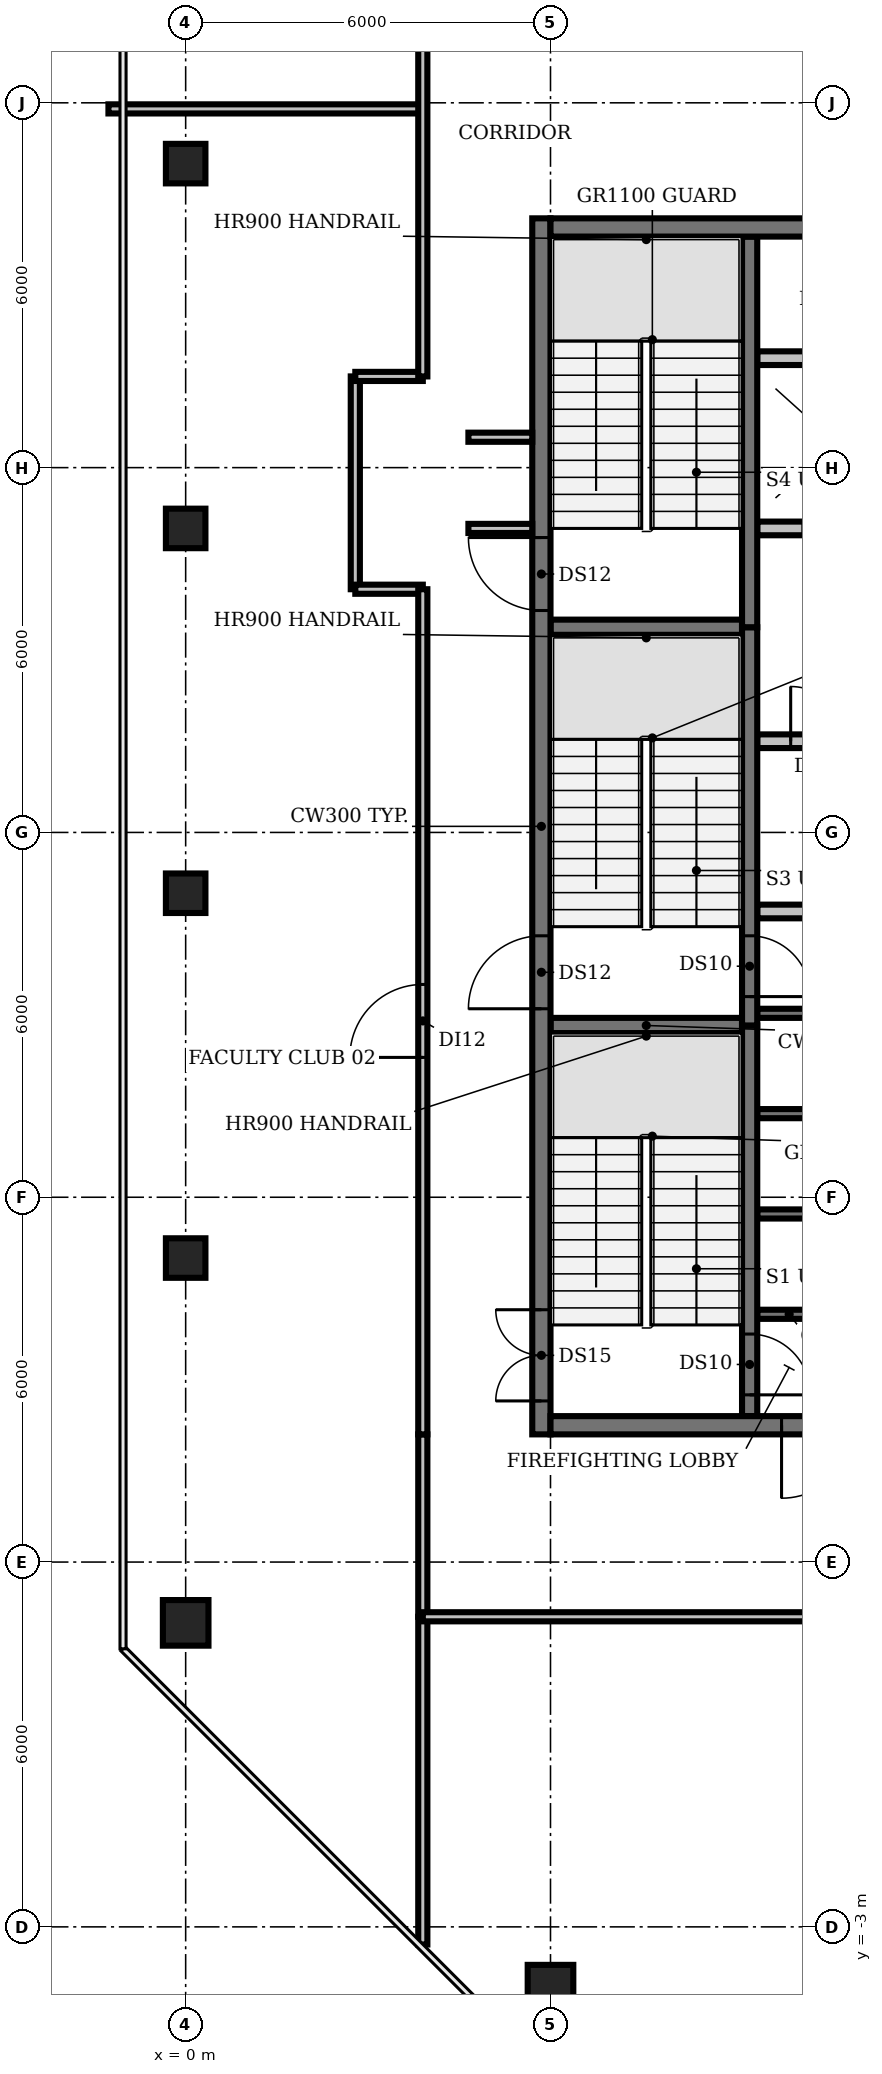
"""IFC4 building model, lengths in metres.
Left out: names, types, materials, properties, quantities, classifications, styles, units other than length and angle.
Written with IfcOpenShell. Run it as: python <this file> out.ifc"""

import sys

from ifc_helpers import new_model, si_unit, direction, frame, frame_2d, origin, origin_2d, place, context, subcontext, project, spatial, rectangle, circle, extrude, element, fill, save


model = new_model("IFC4")
c1 = context("Model", 3, precision=1e-05, world=origin(), true_north=direction((0.0, 1.0)))
c2 = subcontext(c1, "Body", "Model", "MODEL_VIEW")
j1 = project(units=[si_unit("LENGTHUNIT", "METRE"), si_unit("PLANEANGLEUNIT", "RADIAN")], contexts=[c1])
p1 = place(None, origin())
s1 = spatial("IfcSite", under=j1, at=p1, CompositionType="ELEMENT")
p2 = place(p1, origin())
s2 = spatial("IfcBuilding", under=s1, at=p2, CompositionType="ELEMENT")
p3 = place(p2, frame((0.0, 0.0, 318.8)))
s3 = spatial("IfcBuildingStorey", under=s2, at=p3, CompositionType="ELEMENT", Elevation=318.8)
p4 = place(p3, frame((0.0, 2.0, 0.0), z_axis=(0.0, 0.0, 1.0), x_axis=(1.0, 0.0, 0.0)))
e1 = element("IfcColumn", 1, at=p4, inside=s3, PredefinedType="COLUMN", context=c2, shape_type="SweptSolid", body=[
    extrude(circle(Radius=0.375, at=origin_2d()), origin(), (0.0, 0.0, 1.0), 3.9),
])
for number, where, z_axis, x_axis in (
    (2, (0.0, 8.0, 0.0), (0.0, 0.0, 1.0), (1.0, 0.0, 0.0)),
    (3, (0.0, 14.0, 0.0), (0.0, 0.0, 1.0), (1.0, 0.0, 0.0)),
    (4, (0.0, 20.0, 0.0), (0.0, 0.0, 1.0), (1.0, 0.0, 0.0)),
    (5, (0.0, 26.0, 0.0), (0.0, 0.0, 1.0), (1.0, 0.0, 0.0)),
):
    element("IfcColumn", number, at=place(p3, frame(where, z_axis=z_axis, x_axis=x_axis)), inside=s3, PredefinedType="COLUMN", context=c2, shape_type="SweptSolid", body=[
        extrude(rectangle(XDim=0.65, YDim=0.65, at=origin_2d()), origin(), (0.0, 0.0, 1.0), 3.9),
    ])
p5 = place(p3, frame((6.0, -4.0, 0.0), z_axis=(0.0, 0.0, 1.0), x_axis=(1.0, 0.0, 0.0)))
e6 = element("IfcColumn", 6, at=p5, inside=s3, PredefinedType="COLUMN", context=c2, shape_type="SweptSolid", body=[
    extrude(circle(Radius=0.375, at=origin_2d()), origin(), (0.0, 0.0, 1.0), 3.9),
])
for number, where, z_axis, x_axis in (
    (7, (9.4, 7.075, 0.0), (0.0, 0.0, 1.0), (1.0, 0.0, 0.0)),
    (8, (9.4, 8.725, 0.0), (0.0, 0.0, 1.0), (1.0, 0.0, 0.0)),
    (9, (9.4, 10.375, 0.0), (0.0, 0.0, 1.0), (1.0, 0.0, 0.0)),
):
    element("IfcWall", number, at=place(p3, frame(where, z_axis=z_axis, x_axis=x_axis)), inside=s3, PredefinedType="SHEAR", context=c2, shape_type="SweptSolid", body=[
        extrude(rectangle(XDim=1.05, YDim=0.15, at=frame_2d((0.525, 0.0))), origin(), (0.0, 0.0, 1.0), 3.9),
    ])
p6 = place(p3, frame((6.0, 11.825, 0.0), z_axis=(0.0, 0.0, 1.0), x_axis=(1.0, 0.0, 0.0)))
e10 = element("IfcWall", 10, at=p6, inside=s3, PredefinedType="SHEAR", context=c2, shape_type="SweptSolid", body=[
    extrude(rectangle(XDim=3.15, YDim=0.25, at=frame_2d((1.575, 0.0))), origin(), (0.0, 0.0, 1.0), 3.9),
])
p7 = place(p3, frame((9.4, 12.025, 0.0), z_axis=(0.0, 0.0, 1.0), x_axis=(1.0, 0.0, 0.0)))
e11 = element("IfcWall", 11, at=p7, inside=s3, PredefinedType="SHEAR", context=c2, shape_type="SweptSolid", body=[
    extrude(rectangle(XDim=1.05, YDim=0.15, at=frame_2d((0.525, 0.0))), origin(), (0.0, 0.0, 1.0), 3.9),
])
p8 = place(p3, frame((9.4, 13.7, 0.0), z_axis=(0.0, 0.0, 1.0), x_axis=(1.0, 0.0, 0.0)))
e12 = element("IfcWall", 12, at=p8, inside=s3, PredefinedType="PARTITIONING", context=c2, shape_type="SweptSolid", body=[
    extrude(rectangle(XDim=4.0, YDim=0.225, at=frame_2d((2.0, 0.0))), origin(), (0.0, 0.0, 1.0), 3.9),
])
p9 = place(p3, frame((9.4, 16.5, 0.0), z_axis=(0.0, 0.0, 1.0), x_axis=(1.0, 0.0, 0.0)))
e13 = element("IfcWall", 13, at=p9, inside=s3, PredefinedType="PARTITIONING", context=c2, shape_type="SweptSolid", body=[
    extrude(rectangle(XDim=14.6, YDim=0.225, at=frame_2d((7.3, 0.0))), origin(), (0.0, 0.0, 1.0), 3.9),
])
p10 = place(p9, frame((0.55, 0.0, 0.0)))
e14 = element("IfcOpeningElement", 14, at=p10, cuts=e13, PredefinedType="OPENING", context=c2, shape_type="SweptSolid", body=[
    extrude(rectangle(XDim=0.9, YDim=2.1, at=frame_2d((0.45, 1.05))), frame((0.0, 0.123, 0.0), z_axis=(0.0, -1.0, 0.0), x_axis=(1.0, 0.0, 0.0)), (0.0, 0.0, 1.0), 0.245),
])
p11 = place(p9, frame((6.075, 0.0, 0.0)))
e15 = element("IfcOpeningElement", 15, at=p11, cuts=e13, PredefinedType="OPENING", context=c2, shape_type="SweptSolid", body=[
    extrude(rectangle(XDim=1.0, YDim=2.1, at=frame_2d((0.5, 1.05))), frame((0.0, 0.123, 0.0), z_axis=(0.0, -1.0, 0.0), x_axis=(1.0, 0.0, 0.0)), (0.0, 0.0, 1.0), 0.245),
])
p12 = place(p9, frame((12.4, 0.0, 0.0)))
e16 = element("IfcOpeningElement", 16, at=p12, cuts=e13, PredefinedType="OPENING", context=c2, shape_type="SweptSolid", body=[
    extrude(rectangle(XDim=1.0, YDim=2.1, at=frame_2d((0.5, 1.05))), frame((0.0, 0.123, 0.0), z_axis=(0.0, -1.0, 0.0), x_axis=(1.0, 0.0, 0.0)), (0.0, 0.0, 1.0), 0.245),
])
p13 = place(p3, frame((6.0, 18.375, 0.0), z_axis=(0.0, 0.0, 1.0), x_axis=(1.0, 0.0, 0.0)))
e17 = element("IfcWall", 17, at=p13, inside=s3, PredefinedType="SHEAR", context=c2, shape_type="SweptSolid", body=[
    extrude(rectangle(XDim=3.15, YDim=0.25, at=frame_2d((1.575, 0.0))), origin(), (0.0, 0.0, 1.0), 3.9),
])
p14 = place(p3, frame((24.0, 20.0, 0.0), z_axis=(0.0, 0.0, 1.0), x_axis=(-1.0, 0.0, 0.0)))
e18 = element("IfcWall", 18, at=p14, inside=s3, PredefinedType="PARTITIONING", context=c2, shape_type="SweptSolid", body=[
    extrude(rectangle(XDim=14.6, YDim=0.225, at=frame_2d((7.3, 0.0))), origin(), (0.0, 0.0, 1.0), 3.9),
])
p15 = place(p14, frame((12.75, 0.0, 0.0)))
e19 = element("IfcOpeningElement", 19, at=p15, cuts=e18, PredefinedType="OPENING", context=c2, shape_type="SweptSolid", body=[
    extrude(rectangle(XDim=1.1, YDim=2.1, at=frame_2d((0.55, 1.05))), frame((0.0, 0.123, 0.0), z_axis=(0.0, -1.0, 0.0), x_axis=(1.0, 0.0, 0.0)), (0.0, 0.0, 1.0), 0.245),
])
p16 = place(p14, frame((9.95, 0.0, 0.0)))
e20 = element("IfcOpeningElement", 20, at=p16, cuts=e18, PredefinedType="OPENING", context=c2, shape_type="SweptSolid", body=[
    extrude(rectangle(XDim=1.1, YDim=2.1, at=frame_2d((0.55, 1.05))), frame((0.0, 0.123, 0.0), z_axis=(0.0, -1.0, 0.0), x_axis=(1.0, 0.0, 0.0)), (0.0, 0.0, 1.0), 0.245),
])
p17 = place(p14, frame((7.15, 0.0, 0.0)))
e21 = element("IfcOpeningElement", 21, at=p17, cuts=e18, PredefinedType="OPENING", context=c2, shape_type="SweptSolid", body=[
    extrude(rectangle(XDim=1.1, YDim=2.1, at=frame_2d((0.55, 1.05))), frame((0.0, 0.123, 0.0), z_axis=(0.0, -1.0, 0.0), x_axis=(1.0, 0.0, 0.0)), (0.0, 0.0, 1.0), 0.245),
])
p18 = place(p14, frame((4.35, 0.0, 0.0)))
e22 = element("IfcOpeningElement", 22, at=p18, cuts=e18, PredefinedType="OPENING", context=c2, shape_type="SweptSolid", body=[
    extrude(rectangle(XDim=1.1, YDim=2.1, at=frame_2d((0.55, 1.05))), frame((0.0, 0.123, 0.0), z_axis=(0.0, -1.0, 0.0), x_axis=(1.0, 0.0, 0.0)), (0.0, 0.0, 1.0), 0.245),
])
p19 = place(p14, frame((1.2, 0.0, 0.0)))
e23 = element("IfcOpeningElement", 23, at=p19, cuts=e18, PredefinedType="OPENING", context=c2, shape_type="SweptSolid", body=[
    extrude(rectangle(XDim=1.0, YDim=2.1, at=frame_2d((0.5, 1.05))), frame((0.0, 0.123, 0.0), z_axis=(0.0, -1.0, 0.0), x_axis=(1.0, 0.0, 0.0)), (0.0, 0.0, 1.0), 0.245),
])
p20 = place(p3, frame((9.4, 22.8, 0.0), z_axis=(0.0, 0.0, 1.0), x_axis=(1.0, 0.0, 0.0)))
e24 = element("IfcWall", 24, at=p20, inside=s3, PredefinedType="PARTITIONING", context=c2, shape_type="SweptSolid", body=[
    extrude(rectangle(XDim=14.6, YDim=0.225, at=frame_2d((7.3, 0.0))), origin(), (0.0, 0.0, 1.0), 3.9),
])
p21 = place(p3, frame((9.275, 11.825, 0.0), z_axis=(0.0, 0.0, 1.0), x_axis=(0.0, -1.0, 0.0)))
e25 = element("IfcWall", 25, at=p21, inside=s3, PredefinedType="SHEAR", context=c2, shape_type="SweptSolid", body=[
    extrude(rectangle(XDim=6.425, YDim=0.25, at=frame_2d((3.212, 0.0))), origin(), (0.0, 0.0, 1.0), 3.9),
])
p22 = place(p21, frame((5.075, 0.0, 0.0)))
e26 = element("IfcOpeningElement", 26, at=p22, cuts=e25, PredefinedType="OPENING", context=c2, shape_type="SweptSolid", body=[
    extrude(rectangle(XDim=1.0, YDim=2.1, at=frame_2d((0.5, 1.05))), frame((0.0, 0.135, 0.0), z_axis=(0.0, -1.0, 0.0), x_axis=(1.0, 0.0, 0.0)), (0.0, 0.0, 1.0), 0.27),
])
p23 = place(p3, frame((9.275, 18.375, 0.0), z_axis=(0.0, 0.0, 1.0), x_axis=(0.0, -1.0, 0.0)))
e27 = element("IfcWall", 27, at=p23, inside=s3, PredefinedType="SHEAR", context=c2, shape_type="SweptSolid", body=[
    extrude(rectangle(XDim=6.55, YDim=0.25, at=frame_2d((3.275, 0.0))), origin(), (0.0, 0.0, 1.0), 3.9),
])
p24 = place(p23, frame((5.075, 0.0, 0.0)))
e28 = element("IfcOpeningElement", 28, at=p24, cuts=e27, PredefinedType="OPENING", context=c2, shape_type="SweptSolid", body=[
    extrude(rectangle(XDim=1.0, YDim=2.1, at=frame_2d((0.5, 1.05))), frame((0.0, 0.135, 0.0), z_axis=(0.0, -1.0, 0.0), x_axis=(1.0, 0.0, 0.0)), (0.0, 0.0, 1.0), 0.27),
])
p25 = place(p3, frame((9.275, 18.375, 0.0), z_axis=(0.0, 0.0, 1.0), x_axis=(0.0, 1.0, 0.0)))
e29 = element("IfcWall", 29, at=p25, inside=s3, PredefinedType="SHEAR", context=c2, shape_type="SweptSolid", body=[
    extrude(rectangle(XDim=6.425, YDim=0.25, at=frame_2d((3.212, 0.0))), origin(), (0.0, 0.0, 1.0), 3.9),
])
p26 = place(p3, frame((5.85, 5.1, 0.0), z_axis=(0.0, 0.0, 1.0), x_axis=(0.0, 1.0, 0.0)))
e30 = element("IfcWall", 30, at=p26, inside=s3, PredefinedType="SHEAR", context=c2, shape_type="SweptSolid", body=[
    extrude(rectangle(XDim=20.0, YDim=0.3, at=frame_2d((10.0, 0.0))), origin(), (0.0, 0.0, 1.0), 3.9),
])
p27 = place(p26, frame((0.55, 0.0, 0.0)))
e31 = element("IfcOpeningElement", 31, at=p27, cuts=e30, PredefinedType="OPENING", context=c2, shape_type="SweptSolid", body=[
    extrude(rectangle(XDim=1.5, YDim=2.1, at=frame_2d((0.75, 1.05))), frame((0.0, 0.16, 0.0), z_axis=(0.0, -1.0, 0.0), x_axis=(1.0, 0.0, 0.0)), (0.0, 0.0, 1.0), 0.32),
])
p28 = place(p26, frame((7.0, 0.0, 0.0)))
e32 = element("IfcOpeningElement", 32, at=p28, cuts=e30, PredefinedType="OPENING", context=c2, shape_type="SweptSolid", body=[
    extrude(rectangle(XDim=1.2, YDim=2.1, at=frame_2d((0.6, 1.05))), frame((0.0, 0.16, 0.0), z_axis=(0.0, -1.0, 0.0), x_axis=(1.0, 0.0, 0.0)), (0.0, 0.0, 1.0), 0.32),
])
p29 = place(p26, frame((13.55, 0.0, 0.0)))
e33 = element("IfcOpeningElement", 33, at=p29, cuts=e30, PredefinedType="OPENING", context=c2, shape_type="SweptSolid", body=[
    extrude(rectangle(XDim=1.2, YDim=2.1, at=frame_2d((0.6, 1.05))), frame((0.0, 0.16, 0.0), z_axis=(0.0, -1.0, 0.0), x_axis=(1.0, 0.0, 0.0)), (0.0, 0.0, 1.0), 0.32),
])
p30 = place(p3, frame((24.0, 5.25, 0.0), z_axis=(0.0, 0.0, 1.0), x_axis=(-1.0, 0.0, 0.0)))
e34 = element("IfcWall", 34, at=p30, inside=s3, PredefinedType="SHEAR", context=c2, shape_type="SweptSolid", body=[
    extrude(rectangle(XDim=18.0, YDim=0.3, at=frame_2d((9.0, 0.0))), origin(), (0.0, 0.0, 1.0), 3.9),
])
p31 = place(p30, frame((13.0, 0.0, 0.0)))
e35 = element("IfcOpeningElement", 35, at=p31, cuts=e34, PredefinedType="OPENING", context=c2, shape_type="SweptSolid", body=[
    extrude(rectangle(XDim=1.2, YDim=2.1, at=frame_2d((0.6, 1.05))), frame((0.0, 0.16, 0.0), z_axis=(0.0, -1.0, 0.0), x_axis=(1.0, 0.0, 0.0)), (0.0, 0.0, 1.0), 0.32),
])
p32 = place(p30, frame((4.9, 0.0, 0.0)))
e36 = element("IfcOpeningElement", 36, at=p32, cuts=e34, PredefinedType="OPENING", context=c2, shape_type="SweptSolid", body=[
    extrude(rectangle(XDim=1.0, YDim=2.1, at=frame_2d((0.5, 1.05))), frame((0.0, 0.16, 0.0), z_axis=(0.0, -1.0, 0.0), x_axis=(1.0, 0.0, 0.0)), (0.0, 0.0, 1.0), 0.32),
])
p33 = place(p3, frame((6.0, 24.95, 0.0), z_axis=(0.0, 0.0, 1.0), x_axis=(1.0, 0.0, 0.0)))
e37 = element("IfcWall", 37, at=p33, inside=s3, PredefinedType="SHEAR", context=c2, shape_type="SweptSolid", body=[
    extrude(rectangle(XDim=18.0, YDim=0.3, at=frame_2d((9.0, 0.0))), origin(), (0.0, 0.0, 1.0), 3.9),
])
p34 = place(p3, frame((-1.27, 26.9, 0.0), z_axis=(0.0, 0.0, 1.0), x_axis=(1.0, 0.0, 0.0)))
e38 = element("IfcWall", 38, at=p34, inside=s3, PredefinedType="PARTITIONING", context=c2, shape_type="SweptSolid", body=[
    extrude(rectangle(XDim=5.17, YDim=0.15, at=frame_2d((2.585, 0.0))), origin(), (0.0, 0.0, 1.0), 2.95),
])
p35 = place(p3, frame((2.79, 19.0, 0.0), z_axis=(0.0, 0.0, 1.0), x_axis=(0.0, 1.0, 0.0)))
e39 = element("IfcWall", 39, at=p35, inside=s3, PredefinedType="PARTITIONING", context=c2, shape_type="SweptSolid", body=[
    extrude(rectangle(XDim=3.5, YDim=0.15, at=frame_2d((1.75, 0.0))), origin(), (0.0, 0.0, 1.0), 2.95),
])
for number, where, z_axis, x_axis in (
    (40, (2.79, 19.0, 0.0), (0.0, 0.0, 1.0), (1.0, 0.0, 0.0)),
    (41, (2.79, 22.5, 0.0), (0.0, 0.0, 1.0), (1.0, 0.0, 0.0)),
):
    element("IfcWall", number, at=place(p3, frame(where, z_axis=z_axis, x_axis=x_axis)), inside=s3, PredefinedType="PARTITIONING", context=c2, shape_type="SweptSolid", body=[
        extrude(rectangle(XDim=1.11, YDim=0.15, at=frame_2d((0.555, 0.0))), origin(), (0.0, 0.0, 1.0), 2.95),
    ])
p36 = place(p3, frame((3.9, -3.29, 0.0), z_axis=(0.0, 0.0, 1.0), x_axis=(0.0, 1.0, 0.0)))
e42 = element("IfcWall", 42, at=p36, inside=s3, PredefinedType="PARTITIONING", context=c2, shape_type="SweptSolid", body=[
    extrude(rectangle(XDim=5.39, YDim=0.15, at=frame_2d((2.695, 0.0))), origin(), (0.0, 0.0, 1.0), 2.95),
])
p37 = place(p3, frame((3.9, 2.1, 0.0), z_axis=(0.0, 0.0, 1.0), x_axis=(0.0, 1.0, 0.0)))
e43 = element("IfcWall", 43, at=p37, inside=s3, PredefinedType="PARTITIONING", context=c2, shape_type="SweptSolid", body=[
    extrude(rectangle(XDim=3.0, YDim=0.15, at=frame_2d((1.5, 0.0))), origin(), (0.0, 0.0, 1.0), 2.95),
])
p38 = place(p3, frame((3.9, 5.1, 0.0), z_axis=(0.0, 0.0, 1.0), x_axis=(0.0, 1.0, 0.0)))
e44 = element("IfcWall", 44, at=p38, inside=s3, PredefinedType="PARTITIONING", context=c2, shape_type="SweptSolid", body=[
    extrude(rectangle(XDim=13.9, YDim=0.15, at=frame_2d((6.95, 0.0))), origin(), (0.0, 0.0, 1.0), 2.95),
])
p39 = place(p38, frame((6.2, 0.0, 0.0)))
e45 = element("IfcOpeningElement", 45, at=p39, cuts=e44, PredefinedType="OPENING", context=c2, shape_type="SweptSolid", body=[
    extrude(rectangle(XDim=1.2, YDim=2.1, at=frame_2d((0.6, 1.05))), frame((0.0, 0.085, 0.0), z_axis=(0.0, -1.0, 0.0), x_axis=(1.0, 0.0, 0.0)), (0.0, 0.0, 1.0), 0.17),
])
p40 = place(p3, frame((3.9, 22.5, 0.0), z_axis=(0.0, 0.0, 1.0), x_axis=(0.0, 1.0, 0.0)))
e46 = element("IfcWall", 46, at=p40, inside=s3, PredefinedType="PARTITIONING", context=c2, shape_type="SweptSolid", body=[
    extrude(rectangle(XDim=5.6, YDim=0.15, at=frame_2d((2.8, 0.0))), origin(), (0.0, 0.0, 1.0), 2.95),
])
for number, where, z_axis, x_axis in (
    (47, (4.65, 20.0, 0.0), (0.0, 0.0, 1.0), (1.0, 0.0, 0.0)),
    (48, (4.65, 21.5, 0.0), (0.0, 0.0, 1.0), (1.0, 0.0, 0.0)),
):
    element("IfcWall", number, at=place(p3, frame(where, z_axis=z_axis, x_axis=x_axis)), inside=s3, PredefinedType="PARTITIONING", context=c2, shape_type="SweptSolid", body=[
        extrude(rectangle(XDim=1.05, YDim=0.15, at=frame_2d((0.525, 0.0))), origin(), (0.0, 0.0, 1.0), 2.95),
    ])
p41 = place(p3, frame((26.1, 2.1, 0.0), z_axis=(0.0, 0.0, 1.0), x_axis=(-1.0, 0.0, 0.0)))
e49 = element("IfcWall", 49, at=p41, inside=s3, PredefinedType="PARTITIONING", context=c2, shape_type="SweptSolid", body=[
    extrude(rectangle(XDim=22.2, YDim=0.15, at=frame_2d((11.1, 0.0))), origin(), (0.0, 0.0, 1.0), 2.95),
])
p42 = place(p41, frame((10.6, 0.0, 0.0)))
e50 = element("IfcOpeningElement", 50, at=p42, cuts=e49, PredefinedType="OPENING", context=c2, shape_type="SweptSolid", body=[
    extrude(rectangle(XDim=1.2, YDim=2.1, at=frame_2d((0.6, 1.05))), frame((0.0, 0.085, 0.0), z_axis=(0.0, -1.0, 0.0), x_axis=(1.0, 0.0, 0.0)), (0.0, 0.0, 1.0), 0.17),
])
p43 = place(p10, origin())
e51 = element("IfcDoor", 51, at=p43, inside=s3, OperationType="SINGLE_SWING_LEFT", PredefinedType="DOOR", context=c2, shape_type="SweptSolid", body=[
    extrude(rectangle(XDim=0.9, YDim=2.1, at=frame_2d((0.45, 1.05))), frame((0.0, 0.025, 0.0), z_axis=(0.0, -1.0, 0.0), x_axis=(1.0, 0.0, 0.0)), (0.0, 0.0, 1.0), 0.05),
])
fill(e14, e51)
p44 = place(p22, origin())
e52 = element("IfcDoor", 52, at=p44, inside=s3, OperationType="SINGLE_SWING_RIGHT", PredefinedType="DOOR", context=c2, shape_type="SweptSolid", body=[
    extrude(rectangle(XDim=1.0, YDim=2.1, at=frame_2d((0.5, 1.05))), frame((0.0, 0.025, 0.0), z_axis=(0.0, -1.0, 0.0), x_axis=(1.0, 0.0, 0.0)), (0.0, 0.0, 1.0), 0.05),
])
fill(e26, e52)
p45 = place(p24, origin())
e53 = element("IfcDoor", 53, at=p45, inside=s3, OperationType="SINGLE_SWING_RIGHT", PredefinedType="DOOR", context=c2, shape_type="SweptSolid", body=[
    extrude(rectangle(XDim=1.0, YDim=2.1, at=frame_2d((0.5, 1.05))), frame((0.0, 0.025, 0.0), z_axis=(0.0, -1.0, 0.0), x_axis=(1.0, 0.0, 0.0)), (0.0, 0.0, 1.0), 0.05),
])
fill(e28, e53)
p46 = place(p27, origin())
e54 = element("IfcDoor", 54, at=p46, inside=s3, OperationType="DOUBLE_DOOR_SINGLE_SWING", PredefinedType="DOOR", context=c2, shape_type="SweptSolid", body=[
    extrude(rectangle(XDim=1.5, YDim=2.1, at=frame_2d((0.75, 1.05))), frame((0.0, 0.025, 0.0), z_axis=(0.0, -1.0, 0.0), x_axis=(1.0, 0.0, 0.0)), (0.0, 0.0, 1.0), 0.05),
])
fill(e31, e54)
p47 = place(p28, origin())
e55 = element("IfcDoor", 55, at=p47, inside=s3, OperationType="SINGLE_SWING_LEFT", PredefinedType="DOOR", context=c2, shape_type="SweptSolid", body=[
    extrude(rectangle(XDim=1.2, YDim=2.1, at=frame_2d((0.6, 1.05))), frame((0.0, 0.025, 0.0), z_axis=(0.0, -1.0, 0.0), x_axis=(1.0, 0.0, 0.0)), (0.0, 0.0, 1.0), 0.05),
])
fill(e32, e55)
p48 = place(p29, origin())
e56 = element("IfcDoor", 56, at=p48, inside=s3, OperationType="SINGLE_SWING_RIGHT", PredefinedType="DOOR", context=c2, shape_type="SweptSolid", body=[
    extrude(rectangle(XDim=1.2, YDim=2.1, at=frame_2d((0.6, 1.05))), frame((0.0, 0.025, 0.0), z_axis=(0.0, -1.0, 0.0), x_axis=(1.0, 0.0, 0.0)), (0.0, 0.0, 1.0), 0.05),
])
fill(e33, e56)
p49 = place(p31, origin())
e57 = element("IfcDoor", 57, at=p49, inside=s3, OperationType="SINGLE_SWING_RIGHT", PredefinedType="DOOR", context=c2, shape_type="SweptSolid", body=[
    extrude(rectangle(XDim=1.2, YDim=2.1, at=frame_2d((0.6, 1.05))), frame((0.0, 0.025, 0.0), z_axis=(0.0, -1.0, 0.0), x_axis=(1.0, 0.0, 0.0)), (0.0, 0.0, 1.0), 0.05),
])
fill(e35, e57)
p50 = place(p39, origin())
e58 = element("IfcDoor", 58, at=p50, inside=s3, OperationType="SINGLE_SWING_LEFT", PredefinedType="DOOR", context=c2, shape_type="SweptSolid", body=[
    extrude(rectangle(XDim=1.2, YDim=2.1, at=frame_2d((0.6, 1.05))), frame((0.0, 0.025, 0.0), z_axis=(0.0, -1.0, 0.0), x_axis=(1.0, 0.0, 0.0)), (0.0, 0.0, 1.0), 0.05),
])
fill(e45, e58)
save(model, sys.argv[1])
